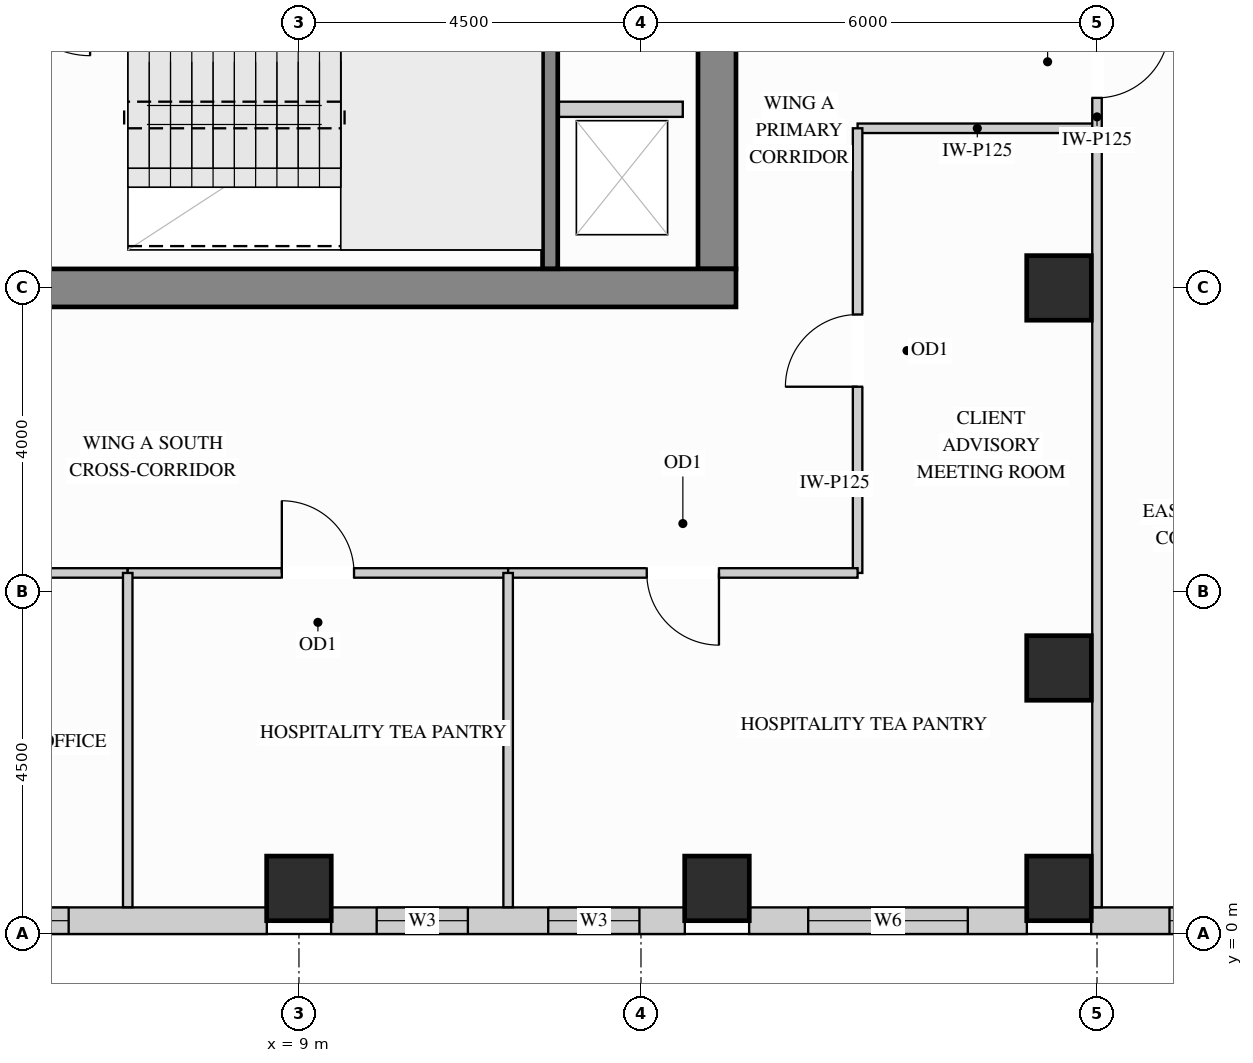
"""IFC4 building model, lengths in metres.
Left out: names, types, materials, properties, quantities, classifications, styles, units other than length and angle.
Written with IfcOpenShell. Run it as: python <this file> out.ifc"""

import sys

from ifc_helpers import new_model, si_unit, direction, frame, frame_2d, origin, origin_2d, place, context, subcontext, project, spatial, rectangle, extrude, source, transform, mapped, element, fill, save


model = new_model("IFC4")
c1 = context("Model", 3, precision=1e-05, world=origin(), true_north=direction((0.0, 1.0)))
c2 = subcontext(c1, "Body", "Model", "MODEL_VIEW")
j1 = project(units=[si_unit("LENGTHUNIT", "METRE"), si_unit("PLANEANGLEUNIT", "RADIAN")], contexts=[c1])
p1 = place(None, origin())
s1 = spatial("IfcSite", under=j1, at=p1, CompositionType="ELEMENT")
p2 = place(p1, origin())
s2 = spatial("IfcBuilding", under=s1, at=p2, CompositionType="ELEMENT")
p3 = place(p2, frame((0.0, 0.0, 270.0)))
s3 = spatial("IfcBuildingStorey", under=s2, at=p3, CompositionType="ELEMENT", Elevation=270.0)
m1 = source(origin(), c2, "Body", "SweptSolid", [
    extrude(rectangle(XDim=0.85, YDim=0.85, at=origin_2d()), origin(), (0.0, 0.0, 1.0), 3.4),
])
for number, where, z_axis, x_axis in (
    (1, (19.0, 3.5, 0.0), (0.0, 0.0, 1.0), (1.0, 0.0, 0.0)),
    (2, (19.0, 8.5, 0.0), (0.0, 0.0, 1.0), (1.0, 0.0, 0.0)),
    (3, (14.5, 0.6, 0.0), (0.0, 0.0, 1.0), (1.0, 0.0, 0.0)),
    (4, (19.0, 0.6, 0.0), (0.0, 0.0, 1.0), (1.0, 0.0, 0.0)),
    (5, (9.0, 0.6, 0.0), (0.0, 0.0, 1.0), (1.0, 0.0, 0.0)),
):
    element("IfcColumn", number, at=place(p3, frame(where, z_axis=z_axis, x_axis=x_axis)), inside=s3, PredefinedType="COLUMN", context=c2, shape_type="MappedRepresentation", body=[
        mapped(m1, transform((0.0, 0.0, 0.0), x_axis=(1.0, 0.0, 0.0), y_axis=(0.0, 1.0, 0.0), z_axis=(0.0, 0.0, 1.0))),
    ])
m2 = source(origin(), c2, "Body", "SweptSolid", [
    extrude(rectangle(XDim=10.07, YDim=0.5, at=frame_2d((5.035, 0.0))), origin(), (0.0, 0.0, 1.0), 3.4),
])
p4 = place(p3, frame((14.5, 8.75, 0.0), z_axis=(0.0, 0.0, 1.0), x_axis=(0.0, 1.0, 0.0)))
e6 = element("IfcWall", 6, at=p4, inside=s3, PredefinedType="SHEAR", context=c2, shape_type="MappedRepresentation", body=[
    mapped(m2, transform((0.0, 0.0, 0.0), x_axis=(1.0, 0.0, 0.0), y_axis=(0.0, 1.0, 0.0), z_axis=(0.0, 0.0, 1.0))),
])
m3 = source(origin(), c2, "Body", "SweptSolid", [
    extrude(rectangle(XDim=10.5, YDim=0.5, at=frame_2d((5.25, 0.0))), origin(), (0.0, 0.0, 1.0), 3.4),
])
p5 = place(p3, frame((4.25, 8.5, 0.0), z_axis=(0.0, 0.0, 1.0), x_axis=(1.0, 0.0, 0.0)))
e7 = element("IfcWall", 7, at=p5, inside=s3, PredefinedType="SHEAR", context=c2, shape_type="MappedRepresentation", body=[
    mapped(m3, transform((0.0, 0.0, 0.0), x_axis=(1.0, 0.0, 0.0), y_axis=(0.0, 1.0, 0.0), z_axis=(0.0, 0.0, 1.0))),
])
p6 = place(p3, frame((3.923, 0.175, 0.0), z_axis=(0.0, 0.0, 1.0), x_axis=(1.0, 0.0, 0.0)))
e8 = element("IfcWall", 8, at=p6, inside=s3, PredefinedType="SOLIDWALL", context=c2, shape_type="SweptSolid", body=[
    extrude(rectangle(XDim=4.654, YDim=0.35, at=frame_2d((2.327, 0.0))), origin(), (0.0, 0.0, 1.0), 3.385),
])
p7 = place(p6, frame((0.847, 0.0, 0.78)))
e9 = element("IfcOpeningElement", 9, at=p7, cuts=e8, PredefinedType="OPENING", context=c2, shape_type="SweptSolid", body=[
    extrude(rectangle(XDim=1.2, YDim=2.25, at=frame_2d((0.6, 1.125))), frame((0.0, 0.185, 0.0), z_axis=(0.0, -1.0, 0.0), x_axis=(1.0, 0.0, 0.0)), (0.0, 0.0, 1.0), 0.37),
])
p8 = place(p3, frame((9.423, 0.175, 0.0), z_axis=(0.0, 0.0, 1.0), x_axis=(1.0, 0.0, 0.0)))
e10 = element("IfcWall", 10, at=p8, inside=s3, PredefinedType="SOLIDWALL", context=c2, shape_type="SweptSolid", body=[
    extrude(rectangle(XDim=4.654, YDim=0.35, at=frame_2d((2.327, 0.0))), origin(), (0.0, 0.0, 1.0), 3.385),
])
p9 = place(p8, frame((0.6, 0.0, 0.78)))
e11 = element("IfcOpeningElement", 11, at=p9, cuts=e10, PredefinedType="OPENING", context=c2, shape_type="SweptSolid", body=[
    extrude(rectangle(XDim=1.2, YDim=2.25, at=frame_2d((0.6, 1.125))), frame((0.0, 0.185, 0.0), z_axis=(0.0, -1.0, 0.0), x_axis=(1.0, 0.0, 0.0)), (0.0, 0.0, 1.0), 0.37),
])
p10 = place(p8, frame((2.856, 0.0, 0.78)))
e12 = element("IfcOpeningElement", 12, at=p10, cuts=e10, PredefinedType="OPENING", context=c2, shape_type="SweptSolid", body=[
    extrude(rectangle(XDim=1.2, YDim=2.25, at=frame_2d((0.6, 1.125))), frame((0.0, 0.185, 0.0), z_axis=(0.0, -1.0, 0.0), x_axis=(1.0, 0.0, 0.0)), (0.0, 0.0, 1.0), 0.37),
])
p11 = place(p3, frame((14.923, 0.175, 0.0), z_axis=(0.0, 0.0, 1.0), x_axis=(1.0, 0.0, 0.0)))
e13 = element("IfcWall", 13, at=p11, inside=s3, PredefinedType="SOLIDWALL", context=c2, shape_type="SweptSolid", body=[
    extrude(rectangle(XDim=3.654, YDim=0.35, at=frame_2d((1.827, 0.0))), origin(), (0.0, 0.0, 1.0), 3.385),
])
p12 = place(p11, frame((0.777, 0.0, 0.78)))
e14 = element("IfcOpeningElement", 14, at=p12, cuts=e13, PredefinedType="OPENING", context=c2, shape_type="SweptSolid", body=[
    extrude(rectangle(XDim=2.1, YDim=2.25, at=frame_2d((1.05, 1.125))), frame((0.0, 0.185, 0.0), z_axis=(0.0, -1.0, 0.0), x_axis=(1.0, 0.0, 0.0)), (0.0, 0.0, 1.0), 0.37),
])
p13 = place(p3, frame((19.423, 0.175, 0.0), z_axis=(0.0, 0.0, 1.0), x_axis=(1.0, 0.0, 0.0)))
e15 = element("IfcWall", 15, at=p13, inside=s3, PredefinedType="SOLIDWALL", context=c2, shape_type="SweptSolid", body=[
    extrude(rectangle(XDim=3.554, YDim=0.35, at=frame_2d((1.777, 0.0))), origin(), (0.0, 0.0, 1.0), 3.385),
])
p14 = place(p13, frame((1.031, 0.0, 0.78)))
e16 = element("IfcOpeningElement", 16, at=p14, cuts=e15, PredefinedType="OPENING", context=c2, shape_type="SweptSolid", body=[
    extrude(rectangle(XDim=1.5, YDim=2.0, at=frame_2d((0.75, 1.0))), frame((0.0, 0.185, 0.0), z_axis=(0.0, -1.0, 0.0), x_axis=(1.0, 0.0, 0.0)), (0.0, 0.0, 1.0), 0.37),
])
m4 = source(origin(), c2, "Body", "SweptSolid", [
    extrude(rectangle(XDim=3.15, YDim=0.125, at=frame_2d((1.575, 0.0))), origin(), (0.0, 0.0, 1.0), 3.385),
])
p15 = place(p3, frame((16.35, 10.6, 0.0), z_axis=(0.0, 0.0, 1.0), x_axis=(1.0, 0.0, 0.0)))
e17 = element("IfcWall", 17, at=p15, inside=s3, PredefinedType="PARTITIONING", context=c2, shape_type="MappedRepresentation", body=[
    mapped(m4, transform((0.0, 0.0, 0.0), x_axis=(1.0, 0.0, 0.0), y_axis=(0.0, 1.0, 0.0), z_axis=(0.0, 0.0, 1.0))),
])
p16 = place(p3, frame((16.35, 4.75, 0.0), z_axis=(0.0, 0.0, 1.0), x_axis=(0.0, 1.0, 0.0)))
e18 = element("IfcWall", 18, at=p16, inside=s3, PredefinedType="PARTITIONING", context=c2, shape_type="SweptSolid", body=[
    extrude(rectangle(XDim=5.85, YDim=0.125, at=frame_2d((2.925, 0.0))), origin(), (0.0, 0.0, 1.0), 3.385),
])
p17 = place(p16, frame((2.45, 0.0, 0.0)))
e19 = element("IfcOpeningElement", 19, at=p17, cuts=e18, PredefinedType="OPENING", context=c2, shape_type="SweptSolid", body=[
    extrude(rectangle(XDim=0.95, YDim=2.15, at=frame_2d((0.475, 1.075))), frame((0.0, 0.073, 0.0), z_axis=(0.0, -1.0, 0.0), x_axis=(1.0, 0.0, 0.0)), (0.0, 0.0, 1.0), 0.145),
])
p18 = place(p3, frame((19.5, 10.6, 0.0), z_axis=(0.0, 0.0, 1.0), x_axis=(0.0, 1.0, 0.0)))
e20 = element("IfcWall", 20, at=p18, inside=s3, PredefinedType="PARTITIONING", context=c2, shape_type="SweptSolid", body=[
    extrude(rectangle(XDim=1.75, YDim=0.125, at=frame_2d((0.875, 0.0))), origin(), (0.0, 0.0, 1.0), 3.385),
])
p19 = place(p18, frame((0.4, 0.0, 0.0)))
e21 = element("IfcOpeningElement", 21, at=p19, cuts=e20, PredefinedType="OPENING", context=c2, shape_type="SweptSolid", body=[
    extrude(rectangle(XDim=0.95, YDim=2.15, at=frame_2d((0.475, 1.075))), frame((0.0, 0.073, 0.0), z_axis=(0.0, -1.0, 0.0), x_axis=(1.0, 0.0, 0.0)), (0.0, 0.0, 1.0), 0.145),
])
m5 = source(origin(), c2, "Body", "SweptSolid", [
    extrude(rectangle(XDim=10.248, YDim=0.125, at=frame_2d((5.124, 0.0))), origin(), (0.0, 0.0, 1.0), 3.385),
])
p20 = place(p3, frame((19.5, 0.352, 0.0), z_axis=(0.0, 0.0, 1.0), x_axis=(0.0, 1.0, 0.0)))
e22 = element("IfcWall", 22, at=p20, inside=s3, PredefinedType="PARTITIONING", context=c2, shape_type="MappedRepresentation", body=[
    mapped(m5, transform((0.0, 0.0, 0.0), x_axis=(1.0, 0.0, 0.0), y_axis=(0.0, 1.0, 0.0), z_axis=(0.0, 0.0, 1.0))),
])
p21 = place(p3, frame((2.45, 4.75, 0.0), z_axis=(0.0, 0.0, 1.0), x_axis=(1.0, 0.0, 0.0)))
e23 = element("IfcWall", 23, at=p21, inside=s3, PredefinedType="PARTITIONING", context=c2, shape_type="SweptSolid", body=[
    extrude(rectangle(XDim=4.297, YDim=0.125, at=frame_2d((2.148, 0.0))), origin(), (0.0, 0.0, 1.0), 2.848),
])
p22 = place(p21, frame((1.674, 0.0, 0.0)))
e24 = element("IfcOpeningElement", 24, at=p22, cuts=e23, PredefinedType="OPENING", context=c2, shape_type="SweptSolid", body=[
    extrude(rectangle(XDim=0.95, YDim=2.15, at=frame_2d((0.475, 1.075))), frame((0.0, 0.073, 0.0), z_axis=(0.0, -1.0, 0.0), x_axis=(1.0, 0.0, 0.0)), (0.0, 0.0, 1.0), 0.145),
])
p23 = place(p3, frame((6.747, 4.75, 0.0), z_axis=(0.0, 0.0, 1.0), x_axis=(1.0, 0.0, 0.0)))
e25 = element("IfcWall", 25, at=p23, inside=s3, PredefinedType="PARTITIONING", context=c2, shape_type="SweptSolid", body=[
    extrude(rectangle(XDim=5.005, YDim=0.125, at=frame_2d((2.502, 0.0))), origin(), (0.0, 0.0, 1.0), 2.848),
])
p24 = place(p23, frame((2.028, 0.0, 0.0)))
e26 = element("IfcOpeningElement", 26, at=p24, cuts=e25, PredefinedType="OPENING", context=c2, shape_type="SweptSolid", body=[
    extrude(rectangle(XDim=0.95, YDim=2.15, at=frame_2d((0.475, 1.075))), frame((0.0, 0.073, 0.0), z_axis=(0.0, -1.0, 0.0), x_axis=(1.0, 0.0, 0.0)), (0.0, 0.0, 1.0), 0.145),
])
p25 = place(p3, frame((11.752, 4.75, 0.0), z_axis=(0.0, 0.0, 1.0), x_axis=(1.0, 0.0, 0.0)))
e27 = element("IfcWall", 27, at=p25, inside=s3, PredefinedType="PARTITIONING", context=c2, shape_type="SweptSolid", body=[
    extrude(rectangle(XDim=4.598, YDim=0.125, at=frame_2d((2.299, 0.0))), origin(), (0.0, 0.0, 1.0), 2.848),
])
p26 = place(p25, frame((1.824, 0.0, 0.0)))
e28 = element("IfcOpeningElement", 28, at=p26, cuts=e27, PredefinedType="OPENING", context=c2, shape_type="SweptSolid", body=[
    extrude(rectangle(XDim=0.95, YDim=2.15, at=frame_2d((0.475, 1.075))), frame((0.0, 0.073, 0.0), z_axis=(0.0, -1.0, 0.0), x_axis=(1.0, 0.0, 0.0)), (0.0, 0.0, 1.0), 0.145),
])
m6 = source(origin(), c2, "Body", "SweptSolid", [
    extrude(rectangle(XDim=4.398, YDim=0.125, at=frame_2d((2.199, 0.0))), origin(), (0.0, 0.0, 1.0), 3.385),
])
for number, where, z_axis, x_axis in (
    (29, (6.747, 0.352, 0.0), (0.0, 0.0, 1.0), (0.0, 1.0, 0.0)),
    (30, (11.752, 0.352, 0.0), (0.0, 0.0, 1.0), (0.0, 1.0, 0.0)),
):
    element("IfcWall", number, at=place(p3, frame(where, z_axis=z_axis, x_axis=x_axis)), inside=s3, PredefinedType="PARTITIONING", context=c2, shape_type="MappedRepresentation", body=[
        mapped(m6, transform((0.0, 0.0, 0.0), x_axis=(1.0, 0.0, 0.0), y_axis=(0.0, 1.0, 0.0), z_axis=(0.0, 0.0, 1.0))),
    ])
m7 = source(origin(), c2, "Body", "SweptSolid", [
    extrude(rectangle(XDim=1.63, YDim=0.2, at=frame_2d((0.815, 0.0))), origin(), (0.0, 0.0, 1.0), 3.385),
])
p27 = place(p3, frame((12.42, 10.85, 0.0), z_axis=(0.0, 0.0, 1.0), x_axis=(1.0, 0.0, 0.0)))
e31 = element("IfcWall", 31, at=p27, inside=s3, PredefinedType="PARTITIONING", context=c2, shape_type="MappedRepresentation", body=[
    mapped(m7, transform((0.0, 0.0, 0.0), x_axis=(1.0, 0.0, 0.0), y_axis=(0.0, 1.0, 0.0), z_axis=(0.0, 0.0, 1.0))),
])
m8 = source(origin(), c2, "Body", "SweptSolid", [
    extrude(rectangle(XDim=3.803, YDim=0.2, at=frame_2d((1.901, 0.0))), origin(), (0.0, 0.0, 1.0), 3.4),
])
p28 = place(p3, frame((12.305, 8.752, 0.0), z_axis=(0.0, 0.0, 1.0), x_axis=(0.0, 1.0, 0.0)))
e32 = element("IfcWall", 32, at=p28, inside=s3, PredefinedType="SHEAR", context=c2, shape_type="MappedRepresentation", body=[
    mapped(m8, transform((0.0, 0.0, 0.0), x_axis=(1.0, 0.0, 0.0), y_axis=(0.0, 1.0, 0.0), z_axis=(0.0, 0.0, 1.0))),
])
m9 = source(origin(), c2, "Body", "SweptSolid", [
    extrude(rectangle(XDim=0.95, YDim=2.15, at=frame_2d((0.475, 1.075))), frame((0.0, 0.025, 0.0), z_axis=(0.0, -1.0, 0.0), x_axis=(1.0, 0.0, 0.0)), (0.0, 0.0, 1.0), 0.05),
])
p29 = place(p17, origin())
e33 = element("IfcDoor", 33, at=p29, inside=s3, OperationType="SINGLE_SWING_LEFT", PredefinedType="DOOR", context=c2, shape_type="MappedRepresentation", body=[
    mapped(m9, transform((0.0, 0.0, 0.0), x_axis=(1.0, 0.0, 0.0), y_axis=(0.0, 1.0, 0.0), z_axis=(0.0, 0.0, 1.0))),
])
fill(e19, e33)
p30 = place(p24, origin())
e34 = element("IfcDoor", 34, at=p30, inside=s3, OperationType="SINGLE_SWING_LEFT", PredefinedType="DOOR", context=c2, shape_type="MappedRepresentation", body=[
    mapped(m9, transform((0.0, 0.0, 0.0), x_axis=(1.0, 0.0, 0.0), y_axis=(0.0, 1.0, 0.0), z_axis=(0.0, 0.0, 1.0))),
])
fill(e26, e34)
p31 = place(p26, origin())
e35 = element("IfcDoor", 35, at=p31, inside=s3, OperationType="SINGLE_SWING_RIGHT", PredefinedType="DOOR", context=c2, shape_type="MappedRepresentation", body=[
    mapped(m9, transform((0.0, 0.0, 0.0), x_axis=(1.0, 0.0, 0.0), y_axis=(0.0, 1.0, 0.0), z_axis=(0.0, 0.0, 1.0))),
])
fill(e28, e35)
p32 = place(p19, origin())
e36 = element("IfcDoor", 36, at=p32, inside=s3, OperationType="SINGLE_SWING_RIGHT", PredefinedType="DOOR", context=c2, shape_type="MappedRepresentation", body=[
    mapped(m9, transform((0.0, 0.0, 0.0), x_axis=(1.0, 0.0, 0.0), y_axis=(0.0, 1.0, 0.0), z_axis=(0.0, 0.0, 1.0))),
])
fill(e21, e36)
m10 = source(origin(), c2, "Body", "SweptSolid", [
    extrude(rectangle(XDim=1.2, YDim=2.25, at=frame_2d((0.6, 1.125))), frame((0.0, 0.03, 0.0), z_axis=(0.0, -1.0, 0.0), x_axis=(1.0, 0.0, 0.0)), (0.0, 0.0, 1.0), 0.06),
])
p33 = place(p7, origin())
e37 = element("IfcWindow", 37, at=p33, inside=s3, PartitioningType="SINGLE_PANEL", PredefinedType="WINDOW", context=c2, shape_type="MappedRepresentation", body=[
    mapped(m10, transform((0.0, 0.0, 0.0), x_axis=(1.0, 0.0, 0.0), y_axis=(0.0, 1.0, 0.0), z_axis=(0.0, 0.0, 1.0))),
])
fill(e9, e37)
p34 = place(p9, origin())
e38 = element("IfcWindow", 38, at=p34, inside=s3, PartitioningType="SINGLE_PANEL", PredefinedType="WINDOW", context=c2, shape_type="MappedRepresentation", body=[
    mapped(m10, transform((0.0, 0.0, 0.0), x_axis=(1.0, 0.0, 0.0), y_axis=(0.0, 1.0, 0.0), z_axis=(0.0, 0.0, 1.0))),
])
fill(e11, e38)
p35 = place(p10, origin())
e39 = element("IfcWindow", 39, at=p35, inside=s3, PartitioningType="SINGLE_PANEL", PredefinedType="WINDOW", context=c2, shape_type="MappedRepresentation", body=[
    mapped(m10, transform((0.0, 0.0, 0.0), x_axis=(1.0, 0.0, 0.0), y_axis=(0.0, 1.0, 0.0), z_axis=(0.0, 0.0, 1.0))),
])
fill(e12, e39)
m11 = source(origin(), c2, "Body", "SweptSolid", [
    extrude(rectangle(XDim=1.5, YDim=2.0, at=frame_2d((0.75, 1.0))), frame((0.0, 0.03, 0.0), z_axis=(0.0, -1.0, 0.0), x_axis=(1.0, 0.0, 0.0)), (0.0, 0.0, 1.0), 0.06),
])
p36 = place(p14, origin())
e40 = element("IfcWindow", 40, at=p36, inside=s3, PartitioningType="SINGLE_PANEL", PredefinedType="WINDOW", context=c2, shape_type="MappedRepresentation", body=[
    mapped(m11, transform((0.0, 0.0, 0.0), x_axis=(1.0, 0.0, 0.0), y_axis=(0.0, 1.0, 0.0), z_axis=(0.0, 0.0, 1.0))),
])
fill(e16, e40)
m12 = source(origin(), c2, "Body", "SweptSolid", [
    extrude(rectangle(XDim=2.1, YDim=2.25, at=frame_2d((1.05, 1.125))), frame((0.0, 0.03, 0.0), z_axis=(0.0, -1.0, 0.0), x_axis=(1.0, 0.0, 0.0)), (0.0, 0.0, 1.0), 0.06),
])
p37 = place(p12, origin())
e41 = element("IfcWindow", 41, at=p37, inside=s3, PartitioningType="SINGLE_PANEL", PredefinedType="WINDOW", context=c2, shape_type="MappedRepresentation", body=[
    mapped(m12, transform((0.0, 0.0, 0.0), x_axis=(1.0, 0.0, 0.0), y_axis=(0.0, 1.0, 0.0), z_axis=(0.0, 0.0, 1.0))),
])
fill(e14, e41)
save(model, sys.argv[1])
